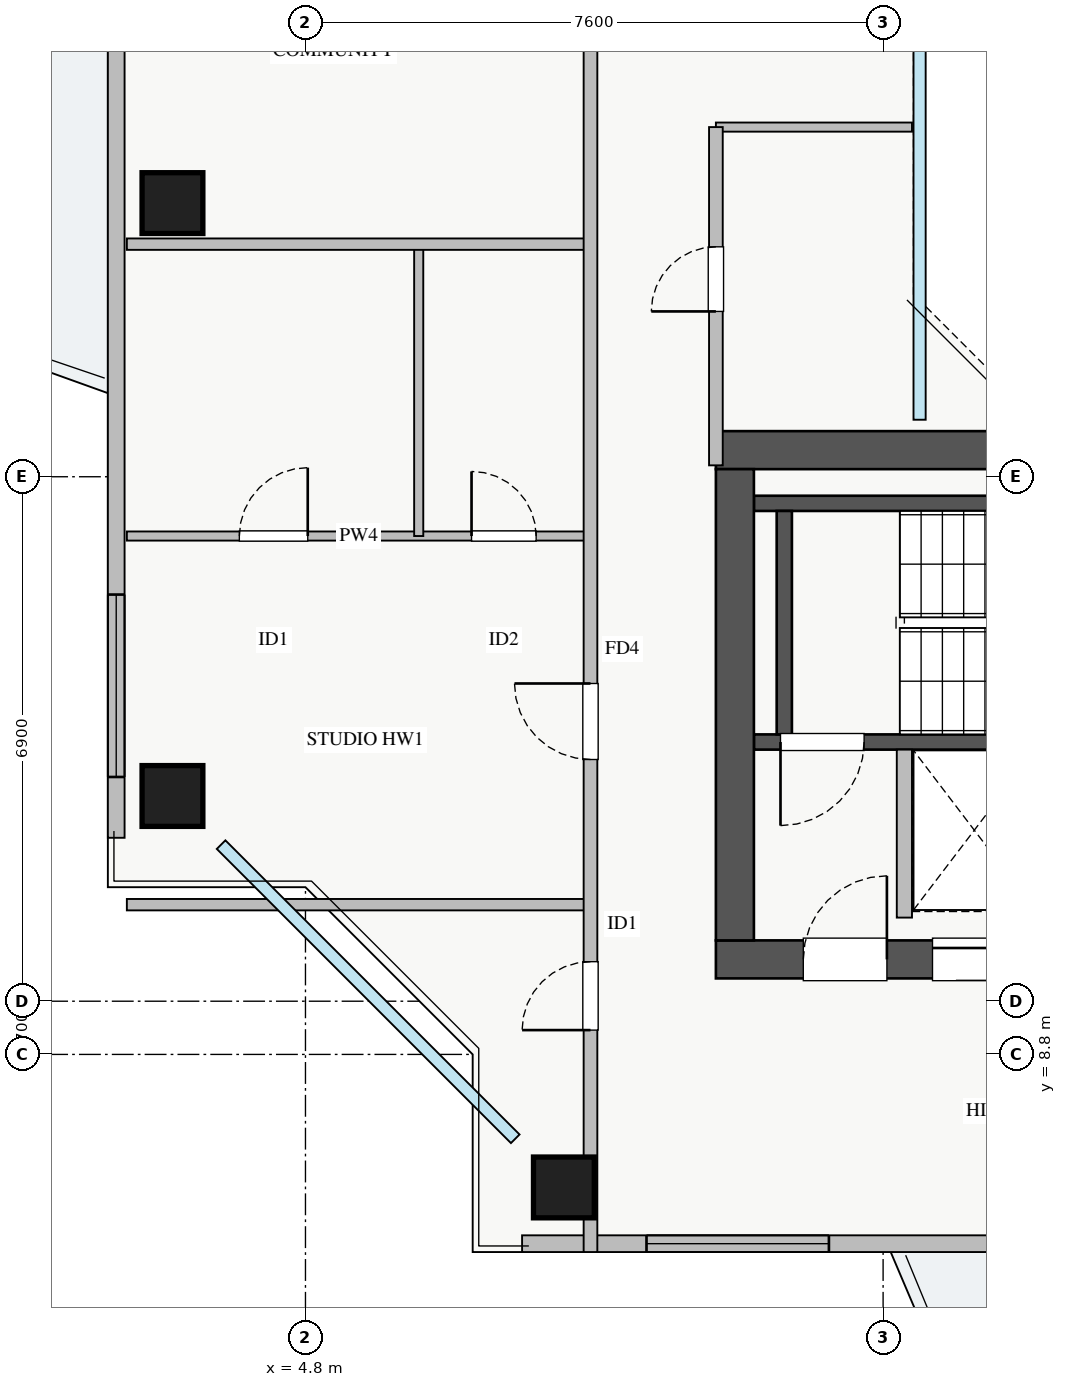
"""IFC4 building model, lengths in metres.
Left out: names, types, materials, properties, quantities, classifications, styles, units other than length and angle.
Written with IfcOpenShell. Run it as: python <this file> out.ifc"""

import sys

from ifc_helpers import new_model, si_unit, direction, frame, frame_2d, origin, origin_2d, place, context, subcontext, project, spatial, rectangle, extrude, source, transform, mapped, element, fill, save


model = new_model("IFC4")
c1 = context("Model", 3, precision=1e-05, world=origin(), true_north=direction((0.0, 1.0)))
c2 = subcontext(c1, "Body", "Model", "MODEL_VIEW")
j1 = project(units=[si_unit("LENGTHUNIT", "METRE"), si_unit("PLANEANGLEUNIT", "RADIAN")], contexts=[c1])
p1 = place(None, origin())
s1 = spatial("IfcSite", under=j1, at=p1, CompositionType="ELEMENT")
p2 = place(p1, origin())
s2 = spatial("IfcBuilding", under=s1, at=p2, CompositionType="ELEMENT")
p3 = place(p2, frame((0.0, 0.0, 200.25)))
s3 = spatial("IfcBuildingStorey", under=s2, at=p3, CompositionType="ELEMENT", Elevation=200.25)
p4 = place(p3, frame((12.68, 12.8, 0.0), z_axis=(0.0, 0.0, 1.0), x_axis=(1.0, 0.0, 0.0)))
e1 = element("IfcWall", 1, at=p4, inside=s3, PredefinedType="SHEAR", context=c2, shape_type="SweptSolid", body=[
    extrude(rectangle(XDim=1.94, YDim=0.18, at=frame_2d((0.97, 0.0))), origin(), (0.0, 0.0, 1.0), 3.07),
])
p5 = place(p3, frame((10.7, 12.91, 0.0), z_axis=(0.0, 0.0, 1.0), x_axis=(1.0, 0.0, 0.0)))
e2 = element("IfcWall", 2, at=p5, inside=s3, PredefinedType="SHEAR", context=c2, shape_type="SweptSolid", body=[
    extrude(rectangle(XDim=7.45, YDim=0.2, at=frame_2d((3.725, 0.0))), origin(), (0.0, 0.0, 1.0), 3.25),
])
p6 = place(p5, frame((0.35, 0.0, 0.0)))
e3 = element("IfcOpeningElement", 3, at=p6, cuts=e2, PredefinedType="OPENING", context=c2, shape_type="SweptSolid", body=[
    extrude(rectangle(XDim=1.1, YDim=2.05, at=frame_2d((0.55, 1.025))), frame((0.0, 0.11, 0.0), z_axis=(0.0, -1.0, 0.0), x_axis=(1.0, 0.0, 0.0)), (0.0, 0.0, 1.0), 0.22),
])
p7 = place(p3, frame((10.7, 16.05, 0.0), z_axis=(0.0, 0.0, 1.0), x_axis=(1.0, 0.0, 0.0)))
e4 = element("IfcWall", 4, at=p7, inside=s3, PredefinedType="SHEAR", context=c2, shape_type="SweptSolid", body=[
    extrude(rectangle(XDim=7.45, YDim=0.2, at=frame_2d((3.725, 0.0))), origin(), (0.0, 0.0, 1.0), 3.25),
])
p8 = place(p3, frame((11.1, 13.01, 0.0), z_axis=(0.0, 0.0, 1.0), x_axis=(0.0, 1.0, 0.0)))
e5 = element("IfcWall", 5, at=p8, inside=s3, PredefinedType="SHEAR", context=c2, shape_type="SweptSolid", body=[
    extrude(rectangle(XDim=2.94, YDim=0.2, at=frame_2d((1.47, 0.0))), origin(), (0.0, 0.0, 1.0), 3.25),
])
p9 = place(p3, frame((10.2, 10.05, 0.0), z_axis=(0.0, 0.0, 1.0), x_axis=(1.0, 0.0, 0.0)))
e6 = element("IfcWall", 6, at=p9, inside=s3, PredefinedType="SHEAR", context=c2, shape_type="SweptSolid", body=[
    extrude(rectangle(XDim=17.6, YDim=0.5, at=frame_2d((8.8, 0.0))), origin(), (0.0, 0.0, 1.0), 3.25),
])
p10 = place(p9, frame((1.15, 0.0, 0.0)))
e7 = element("IfcOpeningElement", 7, at=p10, cuts=e6, PredefinedType="OPENING", context=c2, shape_type="SweptSolid", body=[
    extrude(rectangle(XDim=1.1, YDim=2.05, at=frame_2d((0.55, 1.025))), frame((0.0, 0.26, 0.0), z_axis=(0.0, -1.0, 0.0), x_axis=(1.0, 0.0, 0.0)), (0.0, 0.0, 1.0), 0.52),
])
p11 = place(p9, frame((8.3, 0.0, 0.0)))
e8 = element("IfcOpeningElement", 8, at=p11, cuts=e6, PredefinedType="OPENING", context=c2, shape_type="SweptSolid", body=[
    extrude(rectangle(XDim=1.1, YDim=2.05, at=frame_2d((0.55, 1.025))), frame((0.0, 0.26, 0.0), z_axis=(0.0, -1.0, 0.0), x_axis=(1.0, 0.0, 0.0)), (0.0, 0.0, 1.0), 0.52),
])
p12 = place(p9, frame((2.85, 0.0, 0.0)))
e9 = element("IfcOpeningElement", 9, at=p12, cuts=e6, PredefinedType="OPENING", context=c2, shape_type="SweptSolid", body=[
    extrude(rectangle(XDim=1.1, YDim=2.05, at=frame_2d((0.55, 1.025))), frame((0.0, 0.26, 0.0), z_axis=(0.0, -1.0, 0.0), x_axis=(1.0, 0.0, 0.0)), (0.0, 0.0, 1.0), 0.52),
])
p13 = place(p9, frame((5.8, 0.0, 0.0)))
e10 = element("IfcOpeningElement", 10, at=p13, cuts=e6, PredefinedType="OPENING", context=c2, shape_type="SweptSolid", body=[
    extrude(rectangle(XDim=1.0, YDim=2.05, at=frame_2d((0.5, 1.025))), frame((0.0, 0.26, 0.0), z_axis=(0.0, -1.0, 0.0), x_axis=(1.0, 0.0, 0.0)), (0.0, 0.0, 1.0), 0.52),
])
p14 = place(p9, frame((14.74, 0.0, 0.0)))
e11 = element("IfcOpeningElement", 11, at=p14, cuts=e6, PredefinedType="OPENING", context=c2, shape_type="SweptSolid", body=[
    extrude(rectangle(XDim=1.0, YDim=2.05, at=frame_2d((0.5, 1.025))), frame((0.0, 0.26, 0.0), z_axis=(0.0, -1.0, 0.0), x_axis=(1.0, 0.0, 0.0)), (0.0, 0.0, 1.0), 0.52),
])
p15 = place(p9, frame((10.64, 0.0, 0.0)))
e12 = element("IfcOpeningElement", 12, at=p15, cuts=e6, PredefinedType="OPENING", context=c2, shape_type="SweptSolid", body=[
    extrude(rectangle(XDim=1.0, YDim=2.05, at=frame_2d((0.5, 1.025))), frame((0.0, 0.26, 0.0), z_axis=(0.0, -1.0, 0.0), x_axis=(1.0, 0.0, 0.0)), (0.0, 0.0, 1.0), 0.52),
])
p16 = place(p9, frame((13.09, 0.0, 0.0)))
e13 = element("IfcOpeningElement", 13, at=p16, cuts=e6, PredefinedType="OPENING", context=c2, shape_type="SweptSolid", body=[
    extrude(rectangle(XDim=1.0, YDim=2.05, at=frame_2d((0.5, 1.025))), frame((0.0, 0.26, 0.0), z_axis=(0.0, -1.0, 0.0), x_axis=(1.0, 0.0, 0.0)), (0.0, 0.0, 1.0), 0.52),
])
p17 = place(p3, frame((10.2, 16.75, 0.0), z_axis=(0.0, 0.0, 1.0), x_axis=(1.0, 0.0, 0.0)))
e14 = element("IfcWall", 14, at=p17, inside=s3, PredefinedType="SHEAR", context=c2, shape_type="SweptSolid", body=[
    extrude(rectangle(XDim=17.6, YDim=0.5, at=frame_2d((8.8, 0.0))), origin(), (0.0, 0.0, 1.0), 3.25),
])
p18 = place(p3, frame((10.45, 10.3, 0.0), z_axis=(0.0, 0.0, 1.0), x_axis=(0.0, 1.0, 0.0)))
e15 = element("IfcWall", 15, at=p18, inside=s3, PredefinedType="SHEAR", context=c2, shape_type="SweptSolid", body=[
    extrude(rectangle(XDim=6.2, YDim=0.5, at=frame_2d((3.1, 0.0))), origin(), (0.0, 0.0, 1.0), 3.25),
])
m1 = source(origin(), c2, "Body", "SweptSolid", [
    extrude(rectangle(XDim=0.8, YDim=0.8, at=origin_2d()), origin(), (0.0, 0.0, 1.0), 3.25),
])
for number, where, z_axis, x_axis in (
    (16, (8.2, 7.05, 0.0), (0.0, 0.0, 1.0), (1.0, 0.0, 0.0)),
    (17, (3.05, 20.0, 0.0), (0.0, 0.0, 1.0), (1.0, 0.0, 0.0)),
    (18, (3.05, 12.2, 0.0), (0.0, 0.0, 1.0), (1.0, 0.0, 0.0)),
):
    element("IfcColumn", number, at=place(p3, frame(where, z_axis=z_axis, x_axis=x_axis)), inside=s3, PredefinedType="COLUMN", context=c2, shape_type="MappedRepresentation", body=[
        mapped(m1, transform((0.0, 0.0, 0.0), x_axis=(1.0, 0.0, 0.0), y_axis=(0.0, 1.0, 0.0), z_axis=(0.0, 0.0, 1.0), scale=1.0)),
    ])
p19 = place(p3, frame((7.65, 6.31, 0.0), z_axis=(0.0, 0.0, 1.0), x_axis=(1.0, 0.0, 0.0)))
e19 = element("IfcWall", 19, at=p19, inside=s3, PredefinedType="STANDARD", context=c2, shape_type="SweptSolid", body=[
    extrude(rectangle(XDim=22.7, YDim=0.22, at=frame_2d((11.35, 0.0))), origin(), (0.0, 0.0, 1.0), 2.61),
])
p20 = place(p19, frame((12.2, 0.0, 0.0)))
e20 = element("IfcOpeningElement", 20, at=p20, cuts=e19, PredefinedType="OPENING", context=c2, shape_type="SweptSolid", body=[
    extrude(rectangle(XDim=1.2, YDim=2.1, at=frame_2d((0.6, 1.05))), frame((0.0, 0.12, 0.0), z_axis=(0.0, -1.0, 0.0), x_axis=(1.0, 0.0, 0.0)), (0.0, 0.0, 1.0), 0.24),
])
p21 = place(p19, frame((1.637, 0.0, 0.9)))
e21 = element("IfcOpeningElement", 21, at=p21, cuts=e19, PredefinedType="OPENING", context=c2, shape_type="SweptSolid", body=[
    extrude(rectangle(XDim=2.4, YDim=1.48, at=frame_2d((1.2, 0.74))), frame((0.0, 0.12, 0.0), z_axis=(0.0, -1.0, 0.0), x_axis=(1.0, 0.0, 0.0)), (0.0, 0.0, 1.0), 0.24),
])
p22 = place(p19, frame((7.612, 0.0, 0.9)))
e22 = element("IfcOpeningElement", 22, at=p22, cuts=e19, PredefinedType="OPENING", context=c2, shape_type="SweptSolid", body=[
    extrude(rectangle(XDim=1.8, YDim=1.45, at=frame_2d((0.9, 0.725))), frame((0.0, 0.12, 0.0), z_axis=(0.0, -1.0, 0.0), x_axis=(1.0, 0.0, 0.0)), (0.0, 0.0, 1.0), 0.24),
])
p23 = place(p19, frame((19.837, 0.0, 0.9)))
e23 = element("IfcOpeningElement", 23, at=p23, cuts=e19, PredefinedType="OPENING", context=c2, shape_type="SweptSolid", body=[
    extrude(rectangle(XDim=2.1, YDim=1.5, at=frame_2d((1.05, 0.75))), frame((0.0, 0.12, 0.0), z_axis=(0.0, -1.0, 0.0), x_axis=(1.0, 0.0, 0.0)), (0.0, 0.0, 1.0), 0.24),
])
p24 = place(p3, frame((2.31, 11.65, 0.0), z_axis=(0.0, 0.0, 1.0), x_axis=(0.0, 1.0, 0.0)))
e24 = element("IfcWall", 24, at=p24, inside=s3, PredefinedType="STANDARD", context=c2, shape_type="SweptSolid", body=[
    extrude(rectangle(XDim=22.7, YDim=0.22, at=frame_2d((11.35, 0.0))), origin(), (0.0, 0.0, 1.0), 2.61),
])
p25 = place(p24, frame((12.2, 0.0, 0.0)))
e25 = element("IfcOpeningElement", 25, at=p25, cuts=e24, PredefinedType="OPENING", context=c2, shape_type="SweptSolid", body=[
    extrude(rectangle(XDim=1.2, YDim=2.1, at=frame_2d((0.6, 1.05))), frame((0.0, 0.12, 0.0), z_axis=(0.0, -1.0, 0.0), x_axis=(1.0, 0.0, 0.0)), (0.0, 0.0, 1.0), 0.24),
])
p26 = place(p24, frame((0.8, 0.0, 0.9)))
e26 = element("IfcOpeningElement", 26, at=p26, cuts=e24, PredefinedType="OPENING", context=c2, shape_type="SweptSolid", body=[
    extrude(rectangle(XDim=2.4, YDim=1.5, at=frame_2d((1.2, 0.75))), frame((0.0, 0.12, 0.0), z_axis=(0.0, -1.0, 0.0), x_axis=(1.0, 0.0, 0.0)), (0.0, 0.0, 1.0), 0.24),
])
p27 = place(p24, frame((20.08, 0.0, 0.9)))
e27 = element("IfcOpeningElement", 27, at=p27, cuts=e24, PredefinedType="OPENING", context=c2, shape_type="SweptSolid", body=[
    extrude(rectangle(XDim=2.1, YDim=1.5, at=frame_2d((1.05, 0.75))), frame((0.0, 0.12, 0.0), z_axis=(0.0, -1.0, 0.0), x_axis=(1.0, 0.0, 0.0)), (0.0, 0.0, 1.0), 0.24),
])
p28 = place(p24, frame((16.258, 0.0, 0.9)))
e28 = element("IfcOpeningElement", 28, at=p28, cuts=e24, PredefinedType="OPENING", context=c2, shape_type="SweptSolid", body=[
    extrude(rectangle(XDim=2.4, YDim=1.5, at=frame_2d((1.2, 0.75))), frame((0.0, 0.12, 0.0), z_axis=(0.0, -1.0, 0.0), x_axis=(1.0, 0.0, 0.0)), (0.0, 0.0, 1.0), 0.24),
])
p29 = place(p3, frame((12.68, 10.6, 0.0), z_axis=(0.0, 0.0, 1.0), x_axis=(0.0, 1.0, 0.0)))
e29 = element("IfcWall", 29, at=p29, inside=s3, PredefinedType="PARTITIONING", context=c2, shape_type="SweptSolid", body=[
    extrude(rectangle(XDim=2.21, YDim=0.2, at=frame_2d((1.105, 0.0))), origin(), (0.0, 0.0, 1.0), 3.07),
])
p30 = place(p3, frame((2.45, 10.77, 0.0), z_axis=(0.0, 0.0, 1.0), x_axis=(1.0, 0.0, 0.0)))
e30 = element("IfcWall", 30, at=p30, inside=s3, PredefinedType="PARTITIONING", context=c2, shape_type="SweptSolid", body=[
    extrude(rectangle(XDim=6.1, YDim=0.15, at=frame_2d((3.05, 0.0))), origin(), (0.0, 0.0, 1.0), 3.07),
])
p31 = place(p3, frame((2.45, 15.62, 0.0), z_axis=(0.0, 0.0, 1.0), x_axis=(1.0, 0.0, 0.0)))
e31 = element("IfcWall", 31, at=p31, inside=s3, PredefinedType="PLUMBINGWALL", context=c2, shape_type="SweptSolid", body=[
    extrude(rectangle(XDim=6.1, YDim=0.12, at=frame_2d((3.05, 0.0))), origin(), (0.0, 0.0, 1.0), 3.07),
])
p32 = place(p31, frame((1.48, 0.0, 0.0)))
e32 = element("IfcOpeningElement", 32, at=p32, cuts=e31, PredefinedType="OPENING", context=c2, shape_type="SweptSolid", body=[
    extrude(rectangle(XDim=0.9, YDim=2.05, at=frame_2d((0.45, 1.025))), frame((0.0, 0.07, 0.0), z_axis=(0.0, -1.0, 0.0), x_axis=(1.0, 0.0, 0.0)), (0.0, 0.0, 1.0), 0.14),
])
p33 = place(p31, frame((4.535, 0.0, 0.0)))
e33 = element("IfcOpeningElement", 33, at=p33, cuts=e31, PredefinedType="OPENING", context=c2, shape_type="SweptSolid", body=[
    extrude(rectangle(XDim=0.85, YDim=2.05, at=frame_2d((0.425, 1.025))), frame((0.0, 0.07, 0.0), z_axis=(0.0, -1.0, 0.0), x_axis=(1.0, 0.0, 0.0)), (0.0, 0.0, 1.0), 0.14),
])
p34 = place(p3, frame((6.29, 15.62, 0.0), z_axis=(0.0, 0.0, 1.0), x_axis=(0.0, 1.0, 0.0)))
e34 = element("IfcWall", 34, at=p34, inside=s3, PredefinedType="PLUMBINGWALL", context=c2, shape_type="SweptSolid", body=[
    extrude(rectangle(XDim=3.84, YDim=0.12, at=frame_2d((1.92, 0.0))), origin(), (0.0, 0.0, 1.0), 3.07),
])
p35 = place(p3, frame((2.45, 19.46, 0.0), z_axis=(0.0, 0.0, 1.0), x_axis=(1.0, 0.0, 0.0)))
e35 = element("IfcWall", 35, at=p35, inside=s3, PredefinedType="PARTITIONING", context=c2, shape_type="SweptSolid", body=[
    extrude(rectangle(XDim=6.1, YDim=0.15, at=frame_2d((3.05, 0.0))), origin(), (0.0, 0.0, 1.0), 3.07),
])
p36 = place(p3, frame((8.55, 6.2, 0.0), z_axis=(0.0, 0.0, 1.0), x_axis=(0.0, 1.0, 0.0)))
e36 = element("IfcWall", 36, at=p36, inside=s3, PredefinedType="PARTITIONING", context=c2, shape_type="SweptSolid", body=[
    extrude(rectangle(XDim=33.6, YDim=0.18, at=frame_2d((16.8, 0.0))), origin(), (0.0, 0.0, 1.0), 3.07),
])
p37 = place(p36, frame((29.605, 0.0, 0.0)))
e37 = element("IfcOpeningElement", 37, at=p37, cuts=e36, PredefinedType="OPENING", context=c2, shape_type="SweptSolid", body=[
    extrude(rectangle(XDim=0.9, YDim=2.05, at=frame_2d((0.45, 1.025))), frame((0.0, 0.1, 0.0), z_axis=(0.0, -1.0, 0.0), x_axis=(1.0, 0.0, 0.0)), (0.0, 0.0, 1.0), 0.2),
])
p38 = place(p36, frame((2.92, 0.0, 0.0)))
e38 = element("IfcOpeningElement", 38, at=p38, cuts=e36, PredefinedType="OPENING", context=c2, shape_type="SweptSolid", body=[
    extrude(rectangle(XDim=0.9, YDim=2.05, at=frame_2d((0.45, 1.025))), frame((0.0, 0.1, 0.0), z_axis=(0.0, -1.0, 0.0), x_axis=(1.0, 0.0, 0.0)), (0.0, 0.0, 1.0), 0.2),
])
p39 = place(p36, frame((6.48, 0.0, 0.0)))
e39 = element("IfcOpeningElement", 39, at=p39, cuts=e36, PredefinedType="OPENING", context=c2, shape_type="SweptSolid", body=[
    extrude(rectangle(XDim=1.0, YDim=2.05, at=frame_2d((0.5, 1.025))), frame((0.0, 0.1, 0.0), z_axis=(0.0, -1.0, 0.0), x_axis=(1.0, 0.0, 0.0)), (0.0, 0.0, 1.0), 0.2),
])
p40 = place(p36, frame((16.51, 0.0, 0.0)))
e40 = element("IfcOpeningElement", 40, at=p40, cuts=e36, PredefinedType="OPENING", context=c2, shape_type="SweptSolid", body=[
    extrude(rectangle(XDim=1.0, YDim=2.05, at=frame_2d((0.5, 1.025))), frame((0.0, 0.1, 0.0), z_axis=(0.0, -1.0, 0.0), x_axis=(1.0, 0.0, 0.0)), (0.0, 0.0, 1.0), 0.2),
])
p41 = place(p36, frame((22.21, 0.0, 0.0)))
e41 = element("IfcOpeningElement", 41, at=p41, cuts=e36, PredefinedType="OPENING", context=c2, shape_type="SweptSolid", body=[
    extrude(rectangle(XDim=1.0, YDim=2.05, at=frame_2d((0.5, 1.025))), frame((0.0, 0.1, 0.0), z_axis=(0.0, -1.0, 0.0), x_axis=(1.0, 0.0, 0.0)), (0.0, 0.0, 1.0), 0.2),
])
p42 = place(p3, frame((10.2, 21.0, 0.0), z_axis=(0.0, 0.0, 1.0), x_axis=(1.0, 0.0, 0.0)))
e42 = element("IfcWall", 42, at=p42, inside=s3, PredefinedType="PLUMBINGWALL", context=c2, shape_type="SweptSolid", body=[
    extrude(rectangle(XDim=2.58, YDim=0.12, at=frame_2d((1.29, 0.0))), origin(), (0.0, 0.0, 1.0), 3.07),
])
p43 = place(p3, frame((10.2, 16.55, 0.0), z_axis=(0.0, 0.0, 1.0), x_axis=(0.0, 1.0, 0.0)))
e43 = element("IfcWall", 43, at=p43, inside=s3, PredefinedType="PARTITIONING", context=c2, shape_type="SweptSolid", body=[
    extrude(rectangle(XDim=4.45, YDim=0.18, at=frame_2d((2.225, 0.0))), origin(), (0.0, 0.0, 1.0), 3.07),
])
p44 = place(p43, frame((2.025, 0.0, 0.0)))
e44 = element("IfcOpeningElement", 44, at=p44, cuts=e43, PredefinedType="OPENING", context=c2, shape_type="SweptSolid", body=[
    extrude(rectangle(XDim=0.85, YDim=2.05, at=frame_2d((0.425, 1.025))), frame((0.0, 0.1, 0.0), z_axis=(0.0, -1.0, 0.0), x_axis=(1.0, 0.0, 0.0)), (0.0, 0.0, 1.0), 0.2),
])
m2 = source(origin(), c2, "Body", "SweptSolid", [
    extrude(rectangle(XDim=2.4, YDim=1.48, at=frame_2d((1.2, 0.74))), frame((0.0, 0.03, 0.0), z_axis=(0.0, -1.0, 0.0), x_axis=(1.0, 0.0, 0.0)), (0.0, 0.0, 1.0), 0.06),
])
p45 = place(p21, origin())
e45 = element("IfcWindow", 45, at=p45, inside=s3, PartitioningType="TRIPLE_PANEL_VERTICAL", PredefinedType="WINDOW", context=c2, shape_type="MappedRepresentation", body=[
    mapped(m2, transform((0.0, 0.0, 0.0), x_axis=(1.0, 0.0, 0.0), y_axis=(0.0, 1.0, 0.0), z_axis=(0.0, 0.0, 1.0), scale=1.0)),
])
fill(e21, e45)
m3 = source(origin(), c2, "Body", "SweptSolid", [
    extrude(rectangle(XDim=2.4, YDim=1.5, at=frame_2d((1.2, 0.75))), frame((0.0, 0.03, 0.0), z_axis=(0.0, -1.0, 0.0), x_axis=(1.0, 0.0, 0.0)), (0.0, 0.0, 1.0), 0.06),
])
p46 = place(p26, origin())
e46 = element("IfcWindow", 46, at=p46, inside=s3, PartitioningType="TRIPLE_PANEL_VERTICAL", PredefinedType="WINDOW", context=c2, shape_type="MappedRepresentation", body=[
    mapped(m3, transform((0.0, 0.0, 0.0), x_axis=(1.0, 0.0, 0.0), y_axis=(0.0, 1.0, 0.0), z_axis=(0.0, 0.0, 1.0), scale=1.0)),
])
fill(e26, e46)
m4 = source(origin(), c2, "Body", "SweptSolid", [
    extrude(rectangle(XDim=1.1, YDim=2.05, at=frame_2d((0.55, 1.025))), frame((0.0, 0.025, 0.0), z_axis=(0.0, -1.0, 0.0), x_axis=(1.0, 0.0, 0.0)), (0.0, 0.0, 1.0), 0.05),
])
p47 = place(p10, origin())
e47 = element("IfcDoor", 47, at=p47, inside=s3, OperationType="SINGLE_SWING_RIGHT", PredefinedType="DOOR", context=c2, shape_type="MappedRepresentation", body=[
    mapped(m4, transform((0.0, 0.0, 0.0), x_axis=(1.0, 0.0, 0.0), y_axis=(0.0, 1.0, 0.0), z_axis=(0.0, 0.0, 1.0), scale=1.0)),
])
fill(e7, e47)
p48 = place(p6, frame((1.1, 0.0, 0.0), z_axis=(0.0, 0.0, 1.0), x_axis=(-1.0, 0.0, 0.0)))
e48 = element("IfcDoor", 48, at=p48, inside=s3, OperationType="SINGLE_SWING_LEFT", PredefinedType="DOOR", context=c2, shape_type="MappedRepresentation", body=[
    mapped(m4, transform((0.0, 0.0, 0.0), x_axis=(1.0, 0.0, 0.0), y_axis=(0.0, 1.0, 0.0), z_axis=(0.0, 0.0, 1.0), scale=1.0)),
])
fill(e3, e48)
p49 = place(p12, origin())
e49 = element("IfcDoor", 49, at=p49, inside=s3, OperationType="SLIDING_TO_RIGHT", PredefinedType="DOOR", context=c2, shape_type="MappedRepresentation", body=[
    mapped(m4, transform((0.0, 0.0, 0.0), x_axis=(1.0, 0.0, 0.0), y_axis=(0.0, 1.0, 0.0), z_axis=(0.0, 0.0, 1.0), scale=1.0)),
])
fill(e9, e49)
m5 = source(origin(), c2, "Body", "SweptSolid", [
    extrude(rectangle(XDim=0.9, YDim=2.05, at=frame_2d((0.45, 1.025))), frame((0.0, 0.025, 0.0), z_axis=(0.0, -1.0, 0.0), x_axis=(1.0, 0.0, 0.0)), (0.0, 0.0, 1.0), 0.05),
])
p50 = place(p32, origin())
e50 = element("IfcDoor", 50, at=p50, inside=s3, OperationType="SINGLE_SWING_RIGHT", PredefinedType="DOOR", context=c2, shape_type="MappedRepresentation", body=[
    mapped(m5, transform((0.0, 0.0, 0.0), x_axis=(1.0, 0.0, 0.0), y_axis=(0.0, 1.0, 0.0), z_axis=(0.0, 0.0, 1.0), scale=1.0)),
])
fill(e32, e50)
m6 = source(origin(), c2, "Body", "SweptSolid", [
    extrude(rectangle(XDim=0.85, YDim=2.05, at=frame_2d((0.425, 1.025))), frame((0.0, 0.025, 0.0), z_axis=(0.0, -1.0, 0.0), x_axis=(1.0, 0.0, 0.0)), (0.0, 0.0, 1.0), 0.05),
])
p51 = place(p33, origin())
e51 = element("IfcDoor", 51, at=p51, inside=s3, OperationType="SINGLE_SWING_LEFT", PredefinedType="DOOR", context=c2, shape_type="MappedRepresentation", body=[
    mapped(m6, transform((0.0, 0.0, 0.0), x_axis=(1.0, 0.0, 0.0), y_axis=(0.0, 1.0, 0.0), z_axis=(0.0, 0.0, 1.0), scale=1.0)),
])
fill(e33, e51)
p52 = place(p38, origin())
e52 = element("IfcDoor", 52, at=p52, inside=s3, OperationType="SINGLE_SWING_LEFT", PredefinedType="DOOR", context=c2, shape_type="MappedRepresentation", body=[
    mapped(m5, transform((0.0, 0.0, 0.0), x_axis=(1.0, 0.0, 0.0), y_axis=(0.0, 1.0, 0.0), z_axis=(0.0, 0.0, 1.0), scale=1.0)),
])
fill(e38, e52)
m7 = source(origin(), c2, "Body", "SweptSolid", [
    extrude(rectangle(XDim=1.0, YDim=2.05, at=frame_2d((0.5, 1.025))), frame((0.0, 0.025, 0.0), z_axis=(0.0, -1.0, 0.0), x_axis=(1.0, 0.0, 0.0)), (0.0, 0.0, 1.0), 0.05),
])
p53 = place(p39, origin())
e53 = element("IfcDoor", 53, at=p53, inside=s3, OperationType="SINGLE_SWING_RIGHT", PredefinedType="DOOR", context=c2, shape_type="MappedRepresentation", body=[
    mapped(m7, transform((0.0, 0.0, 0.0), x_axis=(1.0, 0.0, 0.0), y_axis=(0.0, 1.0, 0.0), z_axis=(0.0, 0.0, 1.0), scale=1.0)),
])
fill(e39, e53)
p54 = place(p44, origin())
e54 = element("IfcDoor", 54, at=p54, inside=s3, OperationType="SINGLE_SWING_LEFT", PredefinedType="DOOR", context=c2, shape_type="MappedRepresentation", body=[
    mapped(m6, transform((0.0, 0.0, 0.0), x_axis=(1.0, 0.0, 0.0), y_axis=(0.0, 1.0, 0.0), z_axis=(0.0, 0.0, 1.0), scale=1.0)),
])
fill(e44, e54)
save(model, sys.argv[1])
